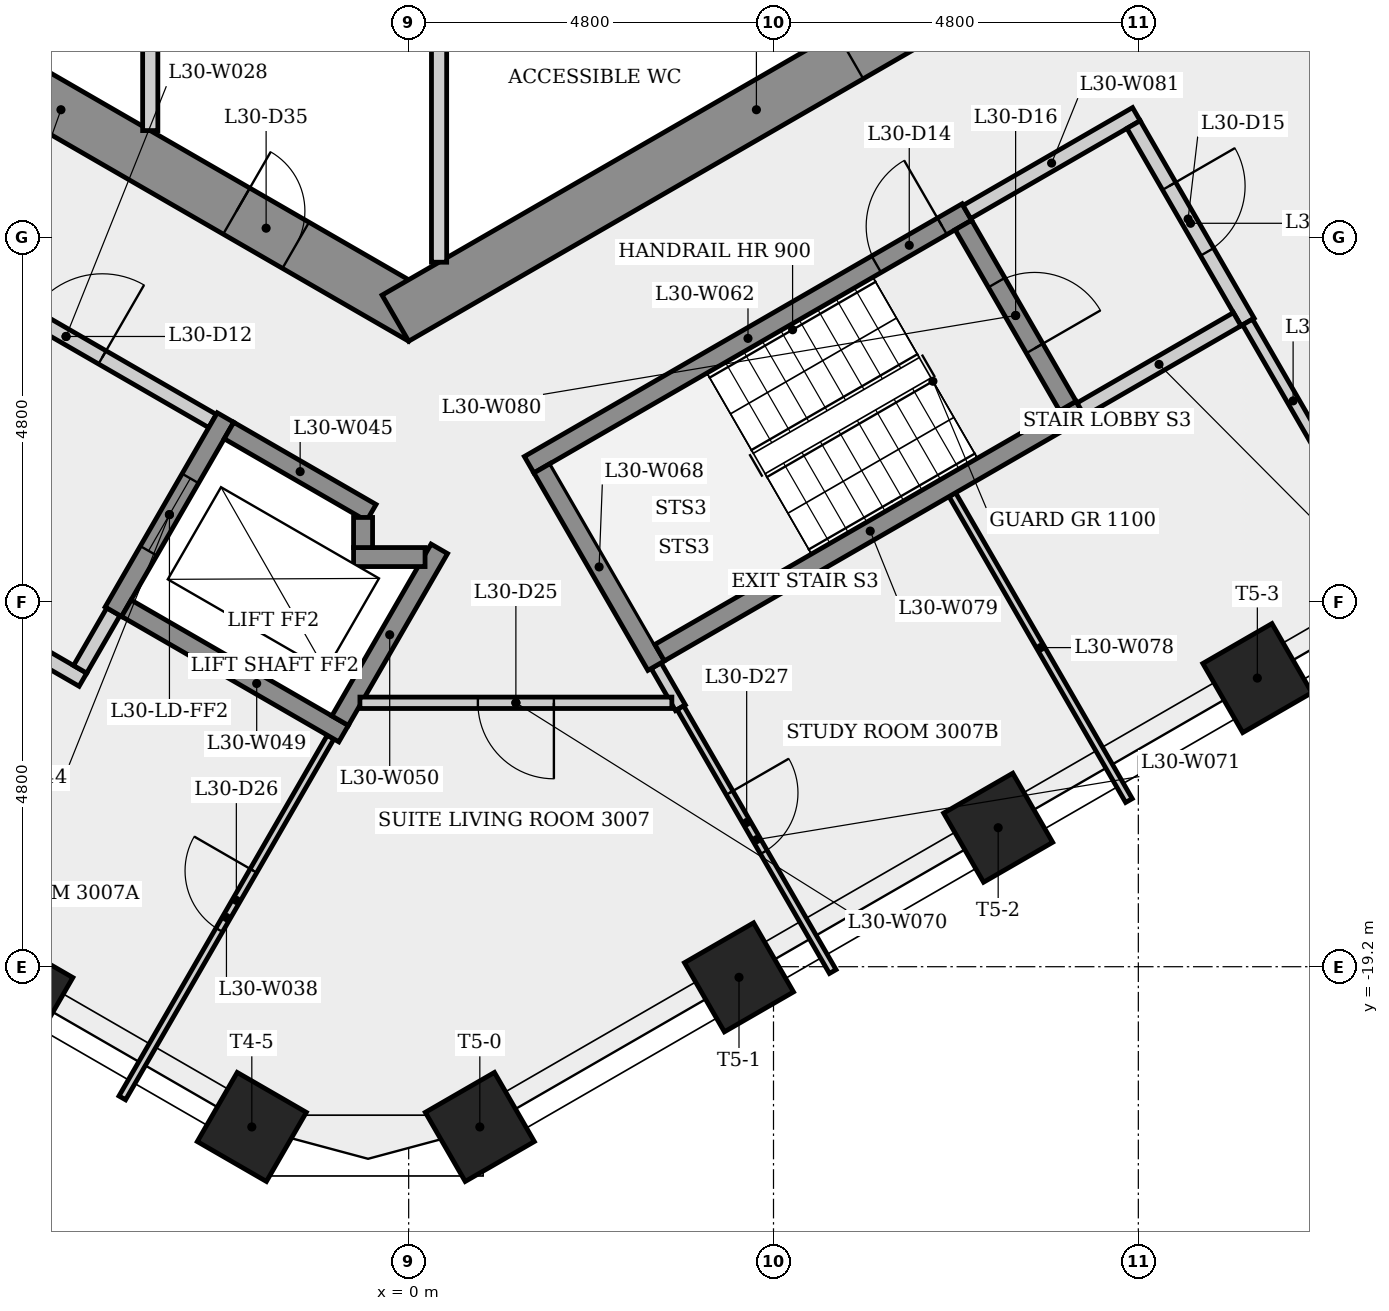
"""IFC4 building model, lengths in metres.
Left out: names, types, materials, properties, quantities, classifications, styles, units other than length and angle.
Written with IfcOpenShell. Run it as: python <this file> out.ifc"""

import sys

from ifc_helpers import new_model, si_unit, direction, frame, frame_2d, origin, origin_2d, place, context, subcontext, project, spatial, rectangle, extrude, element, fill, save


model = new_model("IFC4")
c1 = context("Model", 3, precision=1e-05, world=origin(), true_north=direction((0.0, 1.0)))
c2 = subcontext(c1, "Body", "Model", "MODEL_VIEW")
j1 = project(units=[si_unit("LENGTHUNIT", "METRE"), si_unit("PLANEANGLEUNIT", "RADIAN")], contexts=[c1])
p1 = place(None, origin())
s1 = spatial("IfcSite", under=j1, at=p1, CompositionType="ELEMENT")
p2 = place(p1, origin())
s2 = spatial("IfcBuilding", under=s1, at=p2, CompositionType="ELEMENT")
p3 = place(p2, frame((0.0, 0.0, 113.7)))
s3 = spatial("IfcBuildingStorey", under=s2, at=p3, CompositionType="ELEMENT", Elevation=113.7)
p4 = place(p3, frame((-9.325, -5.182, 0.0), z_axis=(0.0, 0.0, 1.0), x_axis=(0.866023993627, -0.500002442456, 0.0)))
e1 = element("IfcWall", 1, at=p4, inside=s3, PredefinedType="SHEAR", context=c2, shape_type="SweptSolid", body=[
    extrude(rectangle(XDim=10.97, YDim=0.7, at=frame_2d((5.485, 0.0))), origin(), (0.0, 0.0, 1.0), 3.4),
])
p5 = place(p4, frame((0.832, 0.0, 0.0)))
e2 = element("IfcOpeningElement", 2, at=p5, cuts=e1, PredefinedType="OPENING", context=c2, shape_type="SweptSolid", body=[
    extrude(rectangle(XDim=0.9, YDim=2.1, at=frame_2d((0.45, 1.05))), frame((0.0, 0.36, 0.0), z_axis=(0.0, -1.0, 0.0), x_axis=(1.0, 0.0, 0.0)), (0.0, 0.0, 1.0), 0.72),
])
p6 = place(p4, frame((8.152, 0.0, 0.0)))
e3 = element("IfcOpeningElement", 3, at=p6, cuts=e1, PredefinedType="OPENING", context=c2, shape_type="SweptSolid", body=[
    extrude(rectangle(XDim=0.9, YDim=2.1, at=frame_2d((0.45, 1.05))), frame((0.0, 0.36, 0.0), z_axis=(0.0, -1.0, 0.0), x_axis=(1.0, 0.0, 0.0)), (0.0, 0.0, 1.0), 0.72),
])
p7 = place(p3, frame((-0.175, -10.667, 0.0), z_axis=(0.0, 0.0, 1.0), x_axis=(0.866023993627, 0.500002442456, 0.0)))
e4 = element("IfcWall", 4, at=p7, inside=s3, PredefinedType="SHEAR", context=c2, shape_type="SweptSolid", body=[
    extrude(rectangle(XDim=10.97, YDim=0.7, at=frame_2d((5.485, 0.0))), origin(), (0.0, 0.0, 1.0), 3.4),
])
p8 = place(p7, frame((6.906, 0.0, 0.0)))
e5 = element("IfcOpeningElement", 5, at=p8, cuts=e4, PredefinedType="OPENING", context=c2, shape_type="SweptSolid", body=[
    extrude(rectangle(XDim=0.9, YDim=2.1, at=frame_2d((0.45, 1.05))), frame((0.0, 0.36, 0.0), z_axis=(0.0, -1.0, 0.0), x_axis=(1.0, 0.0, 0.0)), (0.0, 0.0, 1.0), 0.72),
])
for number, where, z_axis, x_axis in (
    (6, (-5.135, -19.535, 0.0), (0.0, 0.0, 1.0), (-0.5, -0.866, 0.0)),
    (7, (-2.064, -21.308, 0.0), (0.0, 0.0, 1.0), (-0.5, -0.866, 0.0)),
    (8, (0.936, -21.308, 0.0), (0.0, 0.0, 1.0), (0.5, -0.866, 0.0)),
    (9, (4.346, -19.34, 0.0), (0.0, 0.0, 1.0), (0.5, -0.866, 0.0)),
    (10, (7.756, -17.371, 0.0), (0.0, 0.0, 1.0), (0.5, -0.866, 0.0)),
    (11, (11.166, -15.402, 0.0), (0.0, 0.0, 1.0), (0.5, -0.866, 0.0)),
):
    element("IfcColumn", number, at=place(p3, frame(where, z_axis=z_axis, x_axis=x_axis)), inside=s3, PredefinedType="COLUMN", context=c2, shape_type="SweptSolid", body=[
        extrude(rectangle(XDim=1.05, YDim=1.05, at=origin_2d()), origin(), (0.0, 0.0, 1.0), 3.4),
    ])
p9 = place(p3, frame((-6.435, -9.795, 0.0), z_axis=(0.0, 0.0, 1.0), x_axis=(0.866012907634, -0.500021643343, 0.0)))
e12 = element("IfcWall", 12, at=p9, inside=s3, PredefinedType="PARTITIONING", context=c2, shape_type="SweptSolid", body=[
    extrude(rectangle(XDim=4.45, YDim=0.2, at=frame_2d((2.225, 0.0))), origin(), (0.0, 0.0, 1.0), 3.05),
])
p10 = place(p9, frame((1.675, 0.0, 0.0)))
e13 = element("IfcOpeningElement", 13, at=p10, cuts=e12, PredefinedType="OPENING", context=c2, shape_type="SweptSolid", body=[
    extrude(rectangle(XDim=1.1, YDim=2.1, at=frame_2d((0.55, 1.05))), frame((0.0, 0.11, 0.0), z_axis=(0.0, -1.0, 0.0), x_axis=(1.0, 0.0, 0.0)), (0.0, 0.0, 1.0), 0.22),
])
p11 = place(p3, frame((-4.286, -15.423, 0.0), z_axis=(0.0, 0.0, 1.0), x_axis=(-0.866025371046, 0.500000056704, 0.0)))
e14 = element("IfcWall", 14, at=p11, inside=s3, PredefinedType="PARTITIONING", context=c2, shape_type="SweptSolid", body=[
    extrude(rectangle(XDim=1.7, YDim=0.2, at=frame_2d((0.85, 0.0))), origin(), (0.0, 0.0, 1.0), 3.05),
])
p12 = place(p3, frame((-3.885, -14.529, 0.0), z_axis=(0.0, 0.0, 1.0), x_axis=(-0.499859285417, -0.866106630146, 0.0)))
e15 = element("IfcWall", 15, at=p12, inside=s3, PredefinedType="PARTITIONING", context=c2, shape_type="SweptSolid", body=[
    extrude(rectangle(XDim=0.875, YDim=0.2, at=frame_2d((0.438, 0.0))), origin(), (0.0, 0.0, 1.0), 3.05),
])
p13 = place(p3, frame((-3.768, -20.926, 0.0), z_axis=(0.0, 0.0, 1.0), x_axis=(0.499980760091, 0.866036511666, 0.0)))
e16 = element("IfcWall", 16, at=p13, inside=s3, PredefinedType="PARTITIONING", context=c2, shape_type="SweptSolid", body=[
    extrude(rectangle(XDim=5.482, YDim=0.1, at=frame_2d((2.741, 0.0))), origin(), (0.0, 0.0, 1.0), 3.05),
])
p14 = place(p13, frame((2.551, 0.0, 0.0)))
e17 = element("IfcOpeningElement", 17, at=p14, cuts=e16, PredefinedType="OPENING", context=c2, shape_type="SweptSolid", body=[
    extrude(rectangle(XDim=0.9, YDim=2.1, at=frame_2d((0.45, 1.05))), frame((0.0, 0.06, 0.0), z_axis=(0.0, -1.0, 0.0), x_axis=(1.0, 0.0, 0.0)), (0.0, 0.0, 1.0), 0.12),
])
p15 = place(p3, frame((-3.4, -5.275, 0.0), z_axis=(0.0, 0.0, 1.0), x_axis=(0.0, -1.0, 0.0)))
e18 = element("IfcWall", 18, at=p15, inside=s3, PredefinedType="PARTITIONING", context=c2, shape_type="SweptSolid", body=[
    extrude(rectangle(XDim=2.924, YDim=0.2, at=frame_2d((1.462, 0.0))), origin(), (0.0, 0.0, 1.0), 3.05),
])
p16 = place(p3, frame((-2.41, -11.974, 0.0), z_axis=(0.0, 0.0, 1.0), x_axis=(-0.500001826776, -0.866024349092, 0.0)))
e19 = element("IfcWall", 19, at=p16, inside=s3, PredefinedType="SHEAR", context=c2, shape_type="SweptSolid", body=[
    extrude(rectangle(XDim=2.95, YDim=0.25, at=frame_2d((1.475, 0.0))), origin(), (0.0, 0.0, 1.0), 3.05),
])
p17 = place(p16, frame((0.925, 0.0, 0.0)))
e20 = element("IfcOpeningElement", 20, at=p17, cuts=e19, PredefinedType="OPENING", context=c2, shape_type="SweptSolid", body=[
    extrude(rectangle(XDim=1.1, YDim=2.1, at=frame_2d((0.55, 1.05))), frame((0.0, 0.135, 0.0), z_axis=(0.0, -1.0, 0.0), x_axis=(1.0, 0.0, 0.0)), (0.0, 0.0, 1.0), 0.27),
])
p18 = place(p3, frame((-2.364, -12.145, 0.0), z_axis=(0.0, 0.0, 1.0), x_axis=(0.86603892542, -0.499976579108, 0.0)))
e21 = element("IfcWall", 21, at=p18, inside=s3, PredefinedType="SHEAR", context=c2, shape_type="SweptSolid", body=[
    extrude(rectangle(XDim=2.162, YDim=0.25, at=frame_2d((1.081, 0.0))), origin(), (0.0, 0.0, 1.0), 3.05),
])
p19 = place(p3, frame((-0.856, -16.133, 0.0), z_axis=(0.0, 0.0, 1.0), x_axis=(-0.866021716278, 0.500006386895, 0.0)))
e22 = element("IfcWall", 22, at=p19, inside=s3, PredefinedType="SHEAR", context=c2, shape_type="SweptSolid", body=[
    extrude(rectangle(XDim=3.3, YDim=0.25, at=frame_2d((1.65, 0.0))), origin(), (0.0, 0.0, 1.0), 3.05),
])
p20 = place(p3, frame((-0.902, -15.962, 0.0), z_axis=(0.0, 0.0, 1.0), x_axis=(0.499981517636, 0.866036074319, 0.0)))
e23 = element("IfcWall", 23, at=p20, inside=s3, PredefinedType="SHEAR", context=c2, shape_type="SweptSolid", body=[
    extrude(rectangle(XDim=2.61, YDim=0.25, at=frame_2d((1.305, 0.0))), origin(), (0.0, 0.0, 1.0), 3.05),
])
p21 = place(p3, frame((-0.725, -13.81, 0.0), z_axis=(0.0, 0.0, 1.0), x_axis=(1.0, 0.0, 0.0)))
e24 = element("IfcWall", 24, at=p21, inside=s3, PredefinedType="SHEAR", context=c2, shape_type="SweptSolid", body=[
    extrude(rectangle(XDim=0.941, YDim=0.25, at=frame_2d((0.47, 0.0))), origin(), (0.0, 0.0, 1.0), 3.4),
])
p22 = place(p3, frame((-0.6, -13.289, 0.0), z_axis=(0.0, 0.0, 1.0), x_axis=(0.0, -1.0, 0.0)))
e25 = element("IfcWall", 25, at=p22, inside=s3, PredefinedType="SHEAR", context=c2, shape_type="SweptSolid", body=[
    extrude(rectangle(XDim=0.396, YDim=0.25, at=frame_2d((0.198, 0.0))), origin(), (0.0, 0.0, 1.0), 3.4),
])
p23 = place(p3, frame((0.4, -5.275, 0.0), z_axis=(0.0, 0.0, 1.0), x_axis=(0.0, -1.0, 0.0)))
e26 = element("IfcWall", 26, at=p23, inside=s3, PredefinedType="PARTITIONING", context=c2, shape_type="SweptSolid", body=[
    extrude(rectangle(XDim=4.656, YDim=0.2, at=frame_2d((2.328, 0.0))), origin(), (0.0, 0.0, 1.0), 3.05),
])
p24 = place(p3, frame((1.585, -12.595, 0.0), z_axis=(0.0, 0.0, 1.0), x_axis=(0.866036417653, 0.499980922934, 0.0)))
e27 = element("IfcWall", 27, at=p24, inside=s3, PredefinedType="SHEAR", context=c2, shape_type="SweptSolid", body=[
    extrude(rectangle(XDim=6.65, YDim=0.25, at=frame_2d((3.325, 0.0))), origin(), (0.0, 0.0, 1.0), 3.05),
])
p25 = place(p24, frame((5.275, 0.0, 0.0)))
e28 = element("IfcOpeningElement", 28, at=p25, cuts=e27, PredefinedType="OPENING", context=c2, shape_type="SweptSolid", body=[
    extrude(rectangle(XDim=1.0, YDim=2.1, at=frame_2d((0.5, 1.05))), frame((0.0, 0.135, 0.0), z_axis=(0.0, -1.0, 0.0), x_axis=(1.0, 0.0, 0.0)), (0.0, 0.0, 1.0), 0.27),
])
p26 = place(p3, frame((3.256, -15.239, 0.0), z_axis=(0.0, 0.0, 1.0), x_axis=(0.499876722092, -0.86609656662, 0.0)))
e29 = element("IfcWall", 29, at=p26, inside=s3, PredefinedType="PARTITIONING", context=c2, shape_type="SweptSolid", body=[
    extrude(rectangle(XDim=0.639, YDim=0.15, at=frame_2d((0.32, 0.0))), origin(), (0.0, 0.0, 1.0), 3.05),
])
p27 = place(p3, frame((3.256, -15.239, 0.0), z_axis=(0.0, 0.0, 1.0), x_axis=(-0.50002537861, 0.866010750942, 0.0)))
e30 = element("IfcWall", 30, at=p27, inside=s3, PredefinedType="SHEAR", context=c2, shape_type="SweptSolid", body=[
    extrude(rectangle(XDim=3.0, YDim=0.25, at=frame_2d((1.5, 0.0))), origin(), (0.0, 0.0, 1.0), 3.05),
])
p28 = place(p3, frame((3.463, -15.728, 0.0), z_axis=(0.0, 0.0, 1.0), x_axis=(-1.0, 0.0, 0.0)))
e31 = element("IfcWall", 31, at=p28, inside=s3, PredefinedType="PARTITIONING", context=c2, shape_type="SweptSolid", body=[
    extrude(rectangle(XDim=4.104, YDim=0.15, at=frame_2d((2.052, 0.0))), origin(), (0.0, 0.0, 1.0), 3.05),
])
p29 = place(p28, frame((1.552, 0.0, 0.0)))
e32 = element("IfcOpeningElement", 32, at=p29, cuts=e31, PredefinedType="OPENING", context=c2, shape_type="SweptSolid", body=[
    extrude(rectangle(XDim=1.0, YDim=2.1, at=frame_2d((0.5, 1.05))), frame((0.0, 0.085, 0.0), z_axis=(0.0, -1.0, 0.0), x_axis=(1.0, 0.0, 0.0)), (0.0, 0.0, 1.0), 0.17),
])
p30 = place(p3, frame((3.575, -15.792, 0.0), z_axis=(0.0, 0.0, 1.0), x_axis=(0.50001068386, -0.866019235367, 0.0)))
e33 = element("IfcWall", 33, at=p30, inside=s3, PredefinedType="PARTITIONING", context=c2, shape_type="SweptSolid", body=[
    extrude(rectangle(XDim=4.008, YDim=0.1, at=frame_2d((2.004, 0.0))), origin(), (0.0, 0.0, 1.0), 3.05),
])
p31 = place(p30, frame((1.294, 0.0, 0.0)))
e34 = element("IfcOpeningElement", 34, at=p31, cuts=e33, PredefinedType="OPENING", context=c2, shape_type="SweptSolid", body=[
    extrude(rectangle(XDim=0.9, YDim=2.1, at=frame_2d((0.45, 1.05))), frame((0.0, 0.06, 0.0), z_axis=(0.0, -1.0, 0.0), x_axis=(1.0, 0.0, 0.0)), (0.0, 0.0, 1.0), 0.12),
])
p32 = place(p3, frame((7.153, -12.989, 0.0), z_axis=(0.0, 0.0, 1.0), x_axis=(0.499992256698, -0.866029874336, 0.0)))
e35 = element("IfcWall", 35, at=p32, inside=s3, PredefinedType="PARTITIONING", context=c2, shape_type="SweptSolid", body=[
    extrude(rectangle(XDim=4.647, YDim=0.1, at=frame_2d((2.324, 0.0))), origin(), (0.0, 0.0, 1.0), 3.05),
])
p33 = place(p3, frame((3.301, -15.068, 0.0), z_axis=(0.0, 0.0, 1.0), x_axis=(0.866035036182, 0.499983315828, 0.0)))
e36 = element("IfcWall", 36, at=p33, inside=s3, PredefinedType="SHEAR", context=c2, shape_type="SweptSolid", body=[
    extrude(rectangle(XDim=6.4, YDim=0.25, at=frame_2d((3.2, 0.0))), origin(), (0.0, 0.0, 1.0), 3.05),
])
p34 = place(p3, frame((7.298, -9.441, 0.0), z_axis=(0.0, 0.0, 1.0), x_axis=(0.500034990121, -0.866005201286, 0.0)))
e37 = element("IfcWall", 37, at=p34, inside=s3, PredefinedType="SHEAR", context=c2, shape_type="SweptSolid", body=[
    extrude(rectangle(XDim=2.75, YDim=0.25, at=frame_2d((1.375, 0.0))), origin(), (0.0, 0.0, 1.0), 3.05),
])
p35 = place(p34, frame((0.875, 0.0, 0.0)))
e38 = element("IfcOpeningElement", 38, at=p35, cuts=e37, PredefinedType="OPENING", context=c2, shape_type="SweptSolid", body=[
    extrude(rectangle(XDim=1.0, YDim=2.1, at=frame_2d((0.5, 1.05))), frame((0.0, 0.135, 0.0), z_axis=(0.0, -1.0, 0.0), x_axis=(1.0, 0.0, 0.0)), (0.0, 0.0, 1.0), 0.27),
])
p36 = place(p3, frame((7.344, -9.27, 0.0), z_axis=(0.0, 0.0, 1.0), x_axis=(0.866005588531, 0.500034319456, 0.0)))
e39 = element("IfcWall", 39, at=p36, inside=s3, PredefinedType="PARTITIONING", context=c2, shape_type="SweptSolid", body=[
    extrude(rectangle(XDim=2.575, YDim=0.2, at=frame_2d((1.288, 0.0))), origin(), (0.0, 0.0, 1.0), 3.05),
])
p37 = place(p3, frame((9.537, -8.119, 0.0), z_axis=(0.0, 0.0, 1.0), x_axis=(0.499990139034, -0.866031096941, 0.0)))
e40 = element("IfcWall", 40, at=p37, inside=s3, PredefinedType="PARTITIONING", context=c2, shape_type="SweptSolid", body=[
    extrude(rectangle(XDim=3.0, YDim=0.2, at=frame_2d((1.5, 0.0))), origin(), (0.0, 0.0, 1.0), 3.05),
])
p38 = place(p37, frame((0.935, 0.0, 0.0)))
e41 = element("IfcOpeningElement", 41, at=p38, cuts=e40, PredefinedType="OPENING", context=c2, shape_type="SweptSolid", body=[
    extrude(rectangle(XDim=1.0, YDim=2.1, at=frame_2d((0.5, 1.05))), frame((0.0, 0.11, 0.0), z_axis=(0.0, -1.0, 0.0), x_axis=(1.0, 0.0, 0.0)), (0.0, 0.0, 1.0), 0.22),
])
p39 = place(p3, frame((10.901, -10.681, 0.0), z_axis=(0.0, 0.0, 1.0), x_axis=(-0.866007538022, -0.500030943131, 0.0)))
e42 = element("IfcWall", 42, at=p39, inside=s3, PredefinedType="PARTITIONING", context=c2, shape_type="SweptSolid", body=[
    extrude(rectangle(XDim=2.375, YDim=0.2, at=frame_2d((1.188, 0.0))), origin(), (0.0, 0.0, 1.0), 3.05),
])
p40 = place(p3, frame((12.236, -12.792, 0.0), z_axis=(0.0, 0.0, 1.0), x_axis=(-0.499995825336, 0.866027814014, 0.0)))
e43 = element("IfcWall", 43, at=p40, inside=s3, PredefinedType="PARTITIONING", context=c2, shape_type="SweptSolid", body=[
    extrude(rectangle(XDim=2.396, YDim=0.15, at=frame_2d((1.198, 0.0))), origin(), (0.0, 0.0, 1.0), 3.05),
])
p41 = place(p10, origin())
e44 = element("IfcDoor", 44, at=p41, inside=s3, OperationType="SINGLE_SWING_RIGHT", PredefinedType="DOOR", context=c2, shape_type="SweptSolid", body=[
    extrude(rectangle(XDim=1.1, YDim=2.1, at=frame_2d((0.55, 1.05))), frame((0.0, 0.025, 0.0), z_axis=(0.0, -1.0, 0.0), x_axis=(1.0, 0.0, 0.0)), (0.0, 0.0, 1.0), 0.05),
])
fill(e13, e44)
p42 = place(p17, origin())
e45 = element("IfcDoor", 45, at=p42, inside=s3, OperationType="SLIDING_TO_LEFT", PredefinedType="DOOR", context=c2, shape_type="SweptSolid", body=[
    extrude(rectangle(XDim=1.1, YDim=2.1, at=frame_2d((0.55, 1.05))), frame((0.0, 0.025, 0.0), z_axis=(0.0, -1.0, 0.0), x_axis=(1.0, 0.0, 0.0)), (0.0, 0.0, 1.0), 0.05),
])
fill(e20, e45)
p43 = place(p25, origin())
e46 = element("IfcDoor", 46, at=p43, inside=s3, OperationType="SINGLE_SWING_RIGHT", PredefinedType="DOOR", context=c2, shape_type="SweptSolid", body=[
    extrude(rectangle(XDim=1.0, YDim=2.1, at=frame_2d((0.5, 1.05))), frame((0.0, 0.025, 0.0), z_axis=(0.0, -1.0, 0.0), x_axis=(1.0, 0.0, 0.0)), (0.0, 0.0, 1.0), 0.05),
])
fill(e28, e46)
p44 = place(p38, origin())
e47 = element("IfcDoor", 47, at=p44, inside=s3, OperationType="SINGLE_SWING_LEFT", PredefinedType="DOOR", context=c2, shape_type="SweptSolid", body=[
    extrude(rectangle(XDim=1.0, YDim=2.1, at=frame_2d((0.5, 1.05))), frame((0.0, 0.025, 0.0), z_axis=(0.0, -1.0, 0.0), x_axis=(1.0, 0.0, 0.0)), (0.0, 0.0, 1.0), 0.05),
])
fill(e41, e47)
p45 = place(p35, origin())
e48 = element("IfcDoor", 48, at=p45, inside=s3, OperationType="SINGLE_SWING_RIGHT", PredefinedType="DOOR", context=c2, shape_type="SweptSolid", body=[
    extrude(rectangle(XDim=1.0, YDim=2.1, at=frame_2d((0.5, 1.05))), frame((0.0, 0.025, 0.0), z_axis=(0.0, -1.0, 0.0), x_axis=(1.0, 0.0, 0.0)), (0.0, 0.0, 1.0), 0.05),
])
fill(e38, e48)
p46 = place(p29, origin())
e49 = element("IfcDoor", 49, at=p46, inside=s3, OperationType="SINGLE_SWING_LEFT", PredefinedType="DOOR", context=c2, shape_type="SweptSolid", body=[
    extrude(rectangle(XDim=1.0, YDim=2.1, at=frame_2d((0.5, 1.05))), frame((0.0, 0.025, 0.0), z_axis=(0.0, -1.0, 0.0), x_axis=(1.0, 0.0, 0.0)), (0.0, 0.0, 1.0), 0.05),
])
fill(e32, e49)
p47 = place(p14, origin())
e50 = element("IfcDoor", 50, at=p47, inside=s3, OperationType="SINGLE_SWING_RIGHT", PredefinedType="DOOR", context=c2, shape_type="SweptSolid", body=[
    extrude(rectangle(XDim=0.9, YDim=2.1, at=frame_2d((0.45, 1.05))), frame((0.0, 0.025, 0.0), z_axis=(0.0, -1.0, 0.0), x_axis=(1.0, 0.0, 0.0)), (0.0, 0.0, 1.0), 0.05),
])
fill(e17, e50)
p48 = place(p31, origin())
e51 = element("IfcDoor", 51, at=p48, inside=s3, OperationType="SINGLE_SWING_LEFT", PredefinedType="DOOR", context=c2, shape_type="SweptSolid", body=[
    extrude(rectangle(XDim=0.9, YDim=2.1, at=frame_2d((0.45, 1.05))), frame((0.0, 0.025, 0.0), z_axis=(0.0, -1.0, 0.0), x_axis=(1.0, 0.0, 0.0)), (0.0, 0.0, 1.0), 0.05),
])
fill(e34, e51)
p49 = place(p6, origin())
e52 = element("IfcDoor", 52, at=p49, inside=s3, OperationType="SINGLE_SWING_LEFT", PredefinedType="DOOR", context=c2, shape_type="SweptSolid", body=[
    extrude(rectangle(XDim=0.9, YDim=2.1, at=frame_2d((0.45, 1.05))), frame((0.0, 0.025, 0.0), z_axis=(0.0, -1.0, 0.0), x_axis=(1.0, 0.0, 0.0)), (0.0, 0.0, 1.0), 0.05),
])
fill(e3, e52)
p50 = place(p8, origin())
e53 = element("IfcDoor", 53, at=p50, inside=s3, OperationType="SINGLE_SWING_RIGHT", PredefinedType="DOOR", context=c2, shape_type="SweptSolid", body=[
    extrude(rectangle(XDim=0.9, YDim=2.1, at=frame_2d((0.45, 1.05))), frame((0.0, 0.025, 0.0), z_axis=(0.0, -1.0, 0.0), x_axis=(1.0, 0.0, 0.0)), (0.0, 0.0, 1.0), 0.05),
])
fill(e5, e53)
save(model, sys.argv[1])
